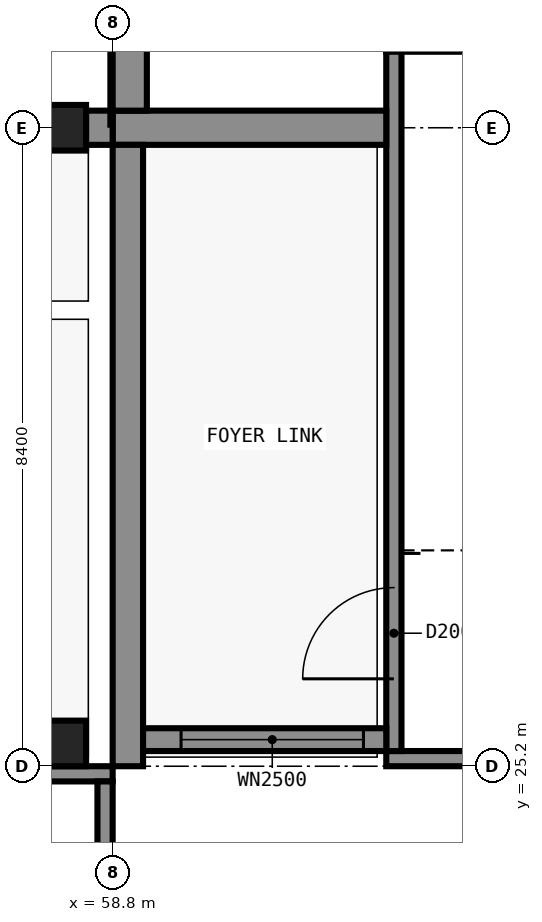
"""IFC4 building model, lengths in metres.
Left out: names, types, materials, properties, quantities, classifications, styles, units other than length and angle.
Written with IfcOpenShell. Run it as: python <this file> out.ifc"""

import sys

from ifc_helpers import new_model, si_unit, direction, frame, frame_2d, origin, origin_2d, place, context, subcontext, project, spatial, rectangle, extrude, element, fill, save


model = new_model("IFC4")
c1 = context("Model", 3, precision=1e-05, world=origin(), true_north=direction((0.0, 1.0)))
c2 = subcontext(c1, "Body", "Model", "MODEL_VIEW")
j1 = project(units=[si_unit("LENGTHUNIT", "METRE"), si_unit("PLANEANGLEUNIT", "RADIAN")], contexts=[c1])
p1 = place(None, origin())
s1 = spatial("IfcSite", under=j1, at=p1, CompositionType="ELEMENT")
p2 = place(p1, origin())
s2 = spatial("IfcBuilding", under=s1, at=p2, CompositionType="ELEMENT")
p3 = place(p2, frame((0.0, 0.0, 10.2)))
s3 = spatial("IfcBuildingStorey", under=s2, at=p3, CompositionType="ELEMENT", Elevation=10.2)
p4 = place(p3, frame((54.0, 25.1, 0.0), z_axis=(0.0, 0.0, 1.0), x_axis=(1.0, 0.0, 0.0)))
e1 = element("IfcWall", 1, at=p4, inside=s3, PredefinedType="SHEAR", context=c2, shape_type="SweptSolid", body=[
    extrude(rectangle(XDim=4.8, YDim=0.2, at=frame_2d((2.4, 0.0))), origin(), (0.0, 0.0, 1.0), 4.8),
])
p5 = place(p3, frame((58.7, 25.0, 0.0), z_axis=(0.0, 0.0, 1.0), x_axis=(0.0, -1.0, 0.0)))
e2 = element("IfcWall", 2, at=p5, inside=s3, PredefinedType="SHEAR", context=c2, shape_type="SweptSolid", body=[
    extrude(rectangle(XDim=9.2, YDim=0.2, at=frame_2d((4.6, 0.0))), origin(), (0.0, 0.0, 1.0), 4.8),
])
for number, where, z_axis, x_axis in (
    (3, (67.2, 25.3, 0.0), (0.0, 0.0, 1.0), (-1.0, 0.0, 0.0)),
    (4, (62.4, 34.7, 0.0), (0.0, 0.0, 1.0), (1.0, 0.0, 0.0)),
):
    element("IfcWall", number, at=place(p3, frame(where, z_axis=z_axis, x_axis=x_axis)), inside=s3, PredefinedType="SHEAR", context=c2, shape_type="SweptSolid", body=[
        extrude(rectangle(XDim=4.8, YDim=0.2, at=frame_2d((2.4, 0.0))), origin(), (0.0, 0.0, 1.0), 4.8),
    ])
p6 = place(p3, frame((62.5, 25.4, 0.0), z_axis=(0.0, 0.0, 1.0), x_axis=(0.0, 1.0, 0.0)))
e5 = element("IfcWall", 5, at=p6, inside=s3, PredefinedType="SHEAR", context=c2, shape_type="SweptSolid", body=[
    extrude(rectangle(XDim=9.2, YDim=0.2, at=frame_2d((4.6, 0.0))), origin(), (0.0, 0.0, 1.0), 4.8),
])
p7 = place(p6, frame((0.95, 0.0, 0.0)))
e6 = element("IfcOpeningElement", 6, at=p7, cuts=e5, PredefinedType="OPENING", context=c2, shape_type="SweptSolid", body=[
    extrude(rectangle(XDim=1.2, YDim=2.1, at=frame_2d((0.6, 1.05))), frame((0.0, 0.11, 0.0), z_axis=(0.0, -1.0, 0.0), x_axis=(1.0, 0.0, 0.0)), (0.0, 0.0, 1.0), 0.22),
])
p8 = place(p3, frame((62.4, 33.6, 0.0), z_axis=(0.0, 0.0, 1.0), x_axis=(-1.0, 0.0, 0.0)))
e7 = element("IfcWall", 7, at=p8, inside=s3, PredefinedType="SHEAR", context=c2, shape_type="SweptSolid", body=[
    extrude(rectangle(XDim=3.6, YDim=0.45, at=frame_2d((1.8, 0.0))), origin(), (0.0, 0.0, 1.0), 4.8),
])
p9 = place(p3, frame((59.025, 33.825, 0.0), z_axis=(0.0, 0.0, 1.0), x_axis=(0.0, 1.0, 0.0)))
e8 = element("IfcWall", 8, at=p9, inside=s3, PredefinedType="SHEAR", context=c2, shape_type="SweptSolid", body=[
    extrude(rectangle(XDim=23.775, YDim=0.45, at=frame_2d((11.888, 0.0))), origin(), (0.0, 0.0, 1.0), 4.8),
])
p10 = place(p3, frame((59.0, 25.2, 0.0), z_axis=(0.0, 0.0, 1.0), x_axis=(0.0, 1.0, 0.0)))
e9 = element("IfcWall", 9, at=p10, inside=s3, PredefinedType="SHEAR", context=c2, shape_type="SweptSolid", body=[
    extrude(rectangle(XDim=8.175, YDim=0.4, at=frame_2d((4.087, 0.0))), origin(), (0.0, 0.0, 1.0), 4.8),
])
for number, where, z_axis, x_axis in (
    (10, (58.15, 25.5, 0.0), (0.0, 0.0, 1.0), (1.0, 0.0, 0.0)),
    (11, (58.15, 33.6, 0.0), (0.0, 0.0, 1.0), (1.0, 0.0, 0.0)),
):
    element("IfcColumn", number, at=place(p3, frame(where, z_axis=z_axis, x_axis=x_axis)), inside=s3, PredefinedType="COLUMN", context=c2, shape_type="SweptSolid", body=[
        extrude(rectangle(XDim=0.6, YDim=0.6, at=origin_2d()), origin(), (0.0, 0.0, 1.0), 4.8),
    ])
p11 = place(p3, frame((58.625, 33.375, 0.0), z_axis=(0.0, 0.0, 1.0), x_axis=(0.0, 1.0, 0.0)))
e12 = element("IfcWall", 12, at=p11, inside=s3, PredefinedType="SHEAR", context=c2, shape_type="SweptSolid", body=[
    extrude(rectangle(XDim=0.45, YDim=0.35, at=frame_2d((0.225, 0.0))), origin(), (0.0, 0.0, 1.0), 4.8),
])
p12 = place(p3, frame((62.4, 25.55, 0.0), z_axis=(0.0, 0.0, 1.0), x_axis=(-1.0, 0.0, 0.0)))
e13 = element("IfcWall", 13, at=p12, inside=s3, PredefinedType="SOLIDWALL", context=c2, shape_type="SweptSolid", body=[
    extrude(rectangle(XDim=3.2, YDim=0.3, at=frame_2d((1.6, 0.0))), origin(), (0.0, 0.0, 1.0), 4.8),
])
p13 = place(p12, frame((0.3, 0.0, 0.9)))
e14 = element("IfcOpeningElement", 14, at=p13, cuts=e13, PredefinedType="OPENING", context=c2, shape_type="SweptSolid", body=[
    extrude(rectangle(XDim=2.4, YDim=1.8, at=frame_2d((1.2, 0.9))), frame((0.0, 0.16, 0.0), z_axis=(0.0, -1.0, 0.0), x_axis=(1.0, 0.0, 0.0)), (0.0, 0.0, 1.0), 0.32),
])
p14 = place(p13, origin())
e15 = element("IfcWindow", 15, at=p14, inside=s3, PartitioningType="SINGLE_PANEL", PredefinedType="WINDOW", context=c2, shape_type="SweptSolid", body=[
    extrude(rectangle(XDim=2.4, YDim=1.8, at=frame_2d((1.2, 0.9))), frame((0.0, 0.03, 0.0), z_axis=(0.0, -1.0, 0.0), x_axis=(1.0, 0.0, 0.0)), (0.0, 0.0, 1.0), 0.06),
])
fill(e14, e15)
p15 = place(p7, origin())
e16 = element("IfcDoor", 16, at=p15, inside=s3, OperationType="SINGLE_SWING_LEFT", PredefinedType="DOOR", context=c2, shape_type="SweptSolid", body=[
    extrude(rectangle(XDim=1.2, YDim=2.1, at=frame_2d((0.6, 1.05))), frame((0.0, 0.025, 0.0), z_axis=(0.0, -1.0, 0.0), x_axis=(1.0, 0.0, 0.0)), (0.0, 0.0, 1.0), 0.05),
])
fill(e6, e16)
save(model, sys.argv[1])
